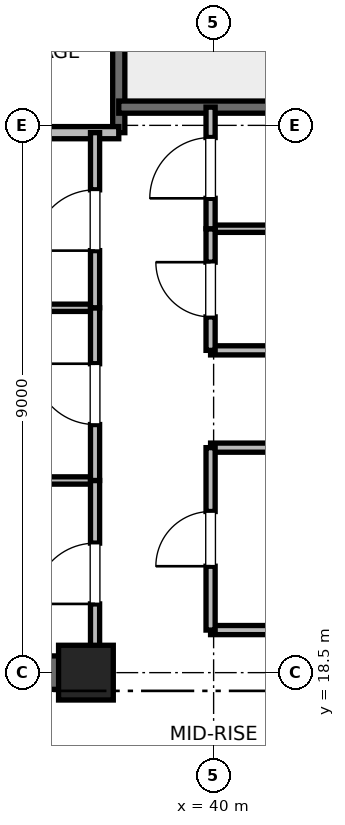
"""IFC4 building model, lengths in metres.
Left out: names, types, materials, properties, quantities, classifications, styles, units other than length and angle.
Written with IfcOpenShell. Run it as: python <this file> out.ifc"""

import sys

from ifc_helpers import new_model, si_unit, direction, frame, frame_2d, origin, origin_2d, place, context, subcontext, project, spatial, rectangle, extrude, element, fill, save


model = new_model("IFC4")
c1 = context("Model", 3, precision=1e-05, world=origin(), true_north=direction((0.0, 1.0)))
c2 = subcontext(c1, "Body", "Model", "MODEL_VIEW")
j1 = project(units=[si_unit("LENGTHUNIT", "METRE"), si_unit("PLANEANGLEUNIT", "RADIAN")], contexts=[c1])
p1 = place(None, origin())
s1 = spatial("IfcSite", under=j1, at=p1, CompositionType="ELEMENT")
p2 = place(p1, origin())
s2 = spatial("IfcBuilding", under=s1, at=p2, CompositionType="ELEMENT")
p3 = place(p2, frame((0.0, 0.0, 209.2)))
s3 = spatial("IfcBuildingStorey", under=s2, at=p3, CompositionType="ELEMENT", Elevation=209.2)
p4 = place(p3, frame((37.9, 18.5, 0.0), z_axis=(0.0, 0.0, 1.0), x_axis=(1.0, 0.0, 0.0)))
e1 = element("IfcColumn", 1, at=p4, inside=s3, PredefinedType="PILASTER", context=c2, shape_type="SweptSolid", body=[
    extrude(rectangle(XDim=0.9, YDim=0.9, at=origin_2d()), origin(), (0.0, 0.0, 1.0), 4.0),
])
p5 = place(p3, frame((29.0, 18.5, 0.0), z_axis=(0.0, 0.0, 1.0), x_axis=(1.0, 0.0, 0.0)))
e2 = element("IfcWall", 2, at=p5, inside=s3, PredefinedType="SHEAR", context=c2, shape_type="SweptSolid", body=[
    extrude(rectangle(XDim=9.2, YDim=0.55, at=frame_2d((4.6, 0.0))), origin(), (0.0, 0.0, 1.0), 3.775),
])
p6 = place(p3, frame((38.44, 27.38, 0.0), z_axis=(0.0, 0.0, 1.0), x_axis=(0.0, 1.0, 0.0)))
e3 = element("IfcWall", 3, at=p6, inside=s3, PredefinedType="SOLIDWALL", context=c2, shape_type="SweptSolid", body=[
    extrude(rectangle(XDim=8.87, YDim=0.2, at=frame_2d((4.435, 0.0))), origin(), (0.0, 0.0, 1.0), 3.775),
])
p7 = place(p3, frame((38.44, 27.8, 0.0), z_axis=(0.0, 0.0, 1.0), x_axis=(1.0, 0.0, 0.0)))
e4 = element("IfcWall", 4, at=p7, inside=s3, PredefinedType="SOLIDWALL", context=c2, shape_type="SweptSolid", body=[
    extrude(rectangle(XDim=3.32, YDim=0.2, at=frame_2d((1.66, 0.0))), origin(), (0.0, 0.0, 1.0), 3.775),
])
p8 = place(p3, frame((32.82, 27.38, 0.0), z_axis=(0.0, 0.0, 1.0), x_axis=(1.0, 0.0, 0.0)))
e5 = element("IfcWall", 5, at=p8, inside=s3, PredefinedType="PARTITIONING", context=c2, shape_type="SweptSolid", body=[
    extrude(rectangle(XDim=5.62, YDim=0.2, at=frame_2d((2.81, 0.0))), origin(), (0.0, 0.0, 1.0), 3.775),
])
for number, where, z_axis, x_axis in (
    (6, (39.95, 19.2, 0.0), (0.0, 0.0, 1.0), (1.0, 0.0, 0.0)),
    (7, (39.95, 22.2, 0.0), (0.0, 0.0, 1.0), (1.0, 0.0, 0.0)),
    (8, (39.95, 23.8, 0.0), (0.0, 0.0, 1.0), (1.0, 0.0, 0.0)),
):
    element("IfcWall", number, at=place(p3, frame(where, z_axis=z_axis, x_axis=x_axis)), inside=s3, PredefinedType="PARTITIONING", context=c2, shape_type="SweptSolid", body=[
        extrude(rectangle(XDim=1.81, YDim=0.15, at=frame_2d((0.905, 0.0))), origin(), (0.0, 0.0, 1.0), 2.85),
    ])
p9 = place(p3, frame((39.95, 25.8, 0.0), z_axis=(0.0, 0.0, 1.0), x_axis=(1.0, 0.0, 0.0)))
e9 = element("IfcWall", 9, at=p9, inside=s3, PredefinedType="PARTITIONING", context=c2, shape_type="SweptSolid", body=[
    extrude(rectangle(XDim=1.81, YDim=0.12, at=frame_2d((0.905, 0.0))), origin(), (0.0, 0.0, 1.0), 2.85),
])
p10 = place(p3, frame((39.95, 19.2, 0.0), z_axis=(0.0, 0.0, 1.0), x_axis=(0.0, 1.0, 0.0)))
e10 = element("IfcWall", 10, at=p10, inside=s3, PredefinedType="PARTITIONING", context=c2, shape_type="SweptSolid", body=[
    extrude(rectangle(XDim=3.0, YDim=0.15, at=frame_2d((1.5, 0.0))), origin(), (0.0, 0.0, 1.0), 2.85),
])
p11 = place(p10, frame((1.05, 0.0, 0.0)))
e11 = element("IfcOpeningElement", 11, at=p11, cuts=e10, PredefinedType="OPENING", context=c2, shape_type="SweptSolid", body=[
    extrude(rectangle(XDim=0.9, YDim=2.1, at=frame_2d((0.45, 1.05))), frame((0.0, 0.075, 0.0), z_axis=(0.0, -1.0, 0.0), x_axis=(1.0, 0.0, 0.0)), (0.0, 0.0, 1.0), 0.15),
])
p12 = place(p3, frame((39.95, 23.8, 0.0), z_axis=(0.0, 0.0, 1.0), x_axis=(0.0, 1.0, 0.0)))
e12 = element("IfcWall", 12, at=p12, inside=s3, PredefinedType="PARTITIONING", context=c2, shape_type="SweptSolid", body=[
    extrude(rectangle(XDim=2.0, YDim=0.15, at=frame_2d((1.0, 0.0))), origin(), (0.0, 0.0, 1.0), 2.85),
])
p13 = place(p12, frame((0.55, 0.0, 0.0)))
e13 = element("IfcOpeningElement", 13, at=p13, cuts=e12, PredefinedType="OPENING", context=c2, shape_type="SweptSolid", body=[
    extrude(rectangle(XDim=0.9, YDim=2.1, at=frame_2d((0.45, 1.05))), frame((0.0, 0.075, 0.0), z_axis=(0.0, -1.0, 0.0), x_axis=(1.0, 0.0, 0.0)), (0.0, 0.0, 1.0), 0.15),
])
p14 = place(p3, frame((39.95, 25.8, 0.0), z_axis=(0.0, 0.0, 1.0), x_axis=(0.0, 1.0, 0.0)))
e14 = element("IfcWall", 14, at=p14, inside=s3, PredefinedType="PARTITIONING", context=c2, shape_type="SweptSolid", body=[
    extrude(rectangle(XDim=2.0, YDim=0.15, at=frame_2d((1.0, 0.0))), origin(), (0.0, 0.0, 1.0), 2.85),
])
p15 = place(p14, frame((0.5, 0.0, 0.0)))
e15 = element("IfcOpeningElement", 15, at=p15, cuts=e14, PredefinedType="OPENING", context=c2, shape_type="SweptSolid", body=[
    extrude(rectangle(XDim=1.0, YDim=2.15, at=frame_2d((0.5, 1.075))), frame((0.0, 0.075, 0.0), z_axis=(0.0, -1.0, 0.0), x_axis=(1.0, 0.0, 0.0)), (0.0, 0.0, 1.0), 0.15),
])
for number, where, z_axis, x_axis in (
    (16, (32.82, 21.66, 0.0), (0.0, 0.0, 1.0), (1.0, 0.0, 0.0)),
    (17, (32.82, 24.5, 0.0), (0.0, 0.0, 1.0), (1.0, 0.0, 0.0)),
):
    element("IfcWall", number, at=place(p3, frame(where, z_axis=z_axis, x_axis=x_axis)), inside=s3, PredefinedType="PARTITIONING", context=c2, shape_type="SweptSolid", body=[
        extrude(rectangle(XDim=5.23, YDim=0.12, at=frame_2d((2.615, 0.0))), origin(), (0.0, 0.0, 1.0), 2.85),
    ])
p16 = place(p3, frame((38.05, 18.6, 0.0), z_axis=(0.0, 0.0, 1.0), x_axis=(0.0, 1.0, 0.0)))
e18 = element("IfcWall", 18, at=p16, inside=s3, PredefinedType="PARTITIONING", context=c2, shape_type="SweptSolid", body=[
    extrude(rectangle(XDim=3.06, YDim=0.15, at=frame_2d((1.53, 0.0))), origin(), (0.0, 0.0, 1.0), 2.755),
])
p17 = place(p16, frame((1.03, 0.0, 0.0)))
e19 = element("IfcOpeningElement", 19, at=p17, cuts=e18, PredefinedType="OPENING", context=c2, shape_type="SweptSolid", body=[
    extrude(rectangle(XDim=1.0, YDim=2.15, at=frame_2d((0.5, 1.075))), frame((0.0, 0.075, 0.0), z_axis=(0.0, -1.0, 0.0), x_axis=(1.0, 0.0, 0.0)), (0.0, 0.0, 1.0), 0.15),
])
p18 = place(p3, frame((38.05, 21.66, 0.0), z_axis=(0.0, 0.0, 1.0), x_axis=(0.0, 1.0, 0.0)))
e20 = element("IfcWall", 20, at=p18, inside=s3, PredefinedType="PARTITIONING", context=c2, shape_type="SweptSolid", body=[
    extrude(rectangle(XDim=2.84, YDim=0.15, at=frame_2d((1.42, 0.0))), origin(), (0.0, 0.0, 1.0), 2.85),
])
p19 = place(p18, frame((0.92, 0.0, 0.0)))
e21 = element("IfcOpeningElement", 21, at=p19, cuts=e20, PredefinedType="OPENING", context=c2, shape_type="SweptSolid", body=[
    extrude(rectangle(XDim=1.0, YDim=2.15, at=frame_2d((0.5, 1.075))), frame((0.0, 0.075, 0.0), z_axis=(0.0, -1.0, 0.0), x_axis=(1.0, 0.0, 0.0)), (0.0, 0.0, 1.0), 0.15),
])
p20 = place(p3, frame((38.05, 24.5, 0.0), z_axis=(0.0, 0.0, 1.0), x_axis=(0.0, 1.0, 0.0)))
e22 = element("IfcWall", 22, at=p20, inside=s3, PredefinedType="PARTITIONING", context=c2, shape_type="SweptSolid", body=[
    extrude(rectangle(XDim=2.88, YDim=0.15, at=frame_2d((1.44, 0.0))), origin(), (0.0, 0.0, 1.0), 2.85),
])
p21 = place(p20, frame((0.94, 0.0, 0.0)))
e23 = element("IfcOpeningElement", 23, at=p21, cuts=e22, PredefinedType="OPENING", context=c2, shape_type="SweptSolid", body=[
    extrude(rectangle(XDim=1.0, YDim=2.15, at=frame_2d((0.5, 1.075))), frame((0.0, 0.075, 0.0), z_axis=(0.0, -1.0, 0.0), x_axis=(1.0, 0.0, 0.0)), (0.0, 0.0, 1.0), 0.15),
])
p22 = place(p11, origin())
e24 = element("IfcDoor", 24, at=p22, inside=s3, OperationType="SINGLE_SWING_LEFT", PredefinedType="DOOR", context=c2, shape_type="SweptSolid", body=[
    extrude(rectangle(XDim=0.9, YDim=2.1, at=frame_2d((0.45, 1.05))), frame((0.0, 0.025, 0.0), z_axis=(0.0, -1.0, 0.0), x_axis=(1.0, 0.0, 0.0)), (0.0, 0.0, 1.0), 0.05),
])
fill(e11, e24)
p23 = place(p13, origin())
e25 = element("IfcDoor", 25, at=p23, inside=s3, OperationType="SINGLE_SWING_RIGHT", PredefinedType="DOOR", context=c2, shape_type="SweptSolid", body=[
    extrude(rectangle(XDim=0.9, YDim=2.1, at=frame_2d((0.45, 1.05))), frame((0.0, 0.025, 0.0), z_axis=(0.0, -1.0, 0.0), x_axis=(1.0, 0.0, 0.0)), (0.0, 0.0, 1.0), 0.05),
])
fill(e13, e25)
p24 = place(p15, origin())
e26 = element("IfcDoor", 26, at=p24, inside=s3, OperationType="SINGLE_SWING_LEFT", PredefinedType="DOOR", context=c2, shape_type="SweptSolid", body=[
    extrude(rectangle(XDim=1.0, YDim=2.15, at=frame_2d((0.5, 1.075))), frame((0.0, 0.025, 0.0), z_axis=(0.0, -1.0, 0.0), x_axis=(1.0, 0.0, 0.0)), (0.0, 0.0, 1.0), 0.05),
])
fill(e15, e26)
p25 = place(p17, origin())
e27 = element("IfcDoor", 27, at=p25, inside=s3, OperationType="SINGLE_SWING_LEFT", PredefinedType="DOOR", context=c2, shape_type="SweptSolid", body=[
    extrude(rectangle(XDim=1.0, YDim=2.15, at=frame_2d((0.5, 1.075))), frame((0.0, 0.025, 0.0), z_axis=(0.0, -1.0, 0.0), x_axis=(1.0, 0.0, 0.0)), (0.0, 0.0, 1.0), 0.05),
])
fill(e19, e27)
p26 = place(p19, origin())
e28 = element("IfcDoor", 28, at=p26, inside=s3, OperationType="SINGLE_SWING_RIGHT", PredefinedType="DOOR", context=c2, shape_type="SweptSolid", body=[
    extrude(rectangle(XDim=1.0, YDim=2.15, at=frame_2d((0.5, 1.075))), frame((0.0, 0.025, 0.0), z_axis=(0.0, -1.0, 0.0), x_axis=(1.0, 0.0, 0.0)), (0.0, 0.0, 1.0), 0.05),
])
fill(e21, e28)
p27 = place(p21, origin())
e29 = element("IfcDoor", 29, at=p27, inside=s3, OperationType="SINGLE_SWING_LEFT", PredefinedType="DOOR", context=c2, shape_type="SweptSolid", body=[
    extrude(rectangle(XDim=1.0, YDim=2.15, at=frame_2d((0.5, 1.075))), frame((0.0, 0.025, 0.0), z_axis=(0.0, -1.0, 0.0), x_axis=(1.0, 0.0, 0.0)), (0.0, 0.0, 1.0), 0.05),
])
fill(e23, e29)
save(model, sys.argv[1])
